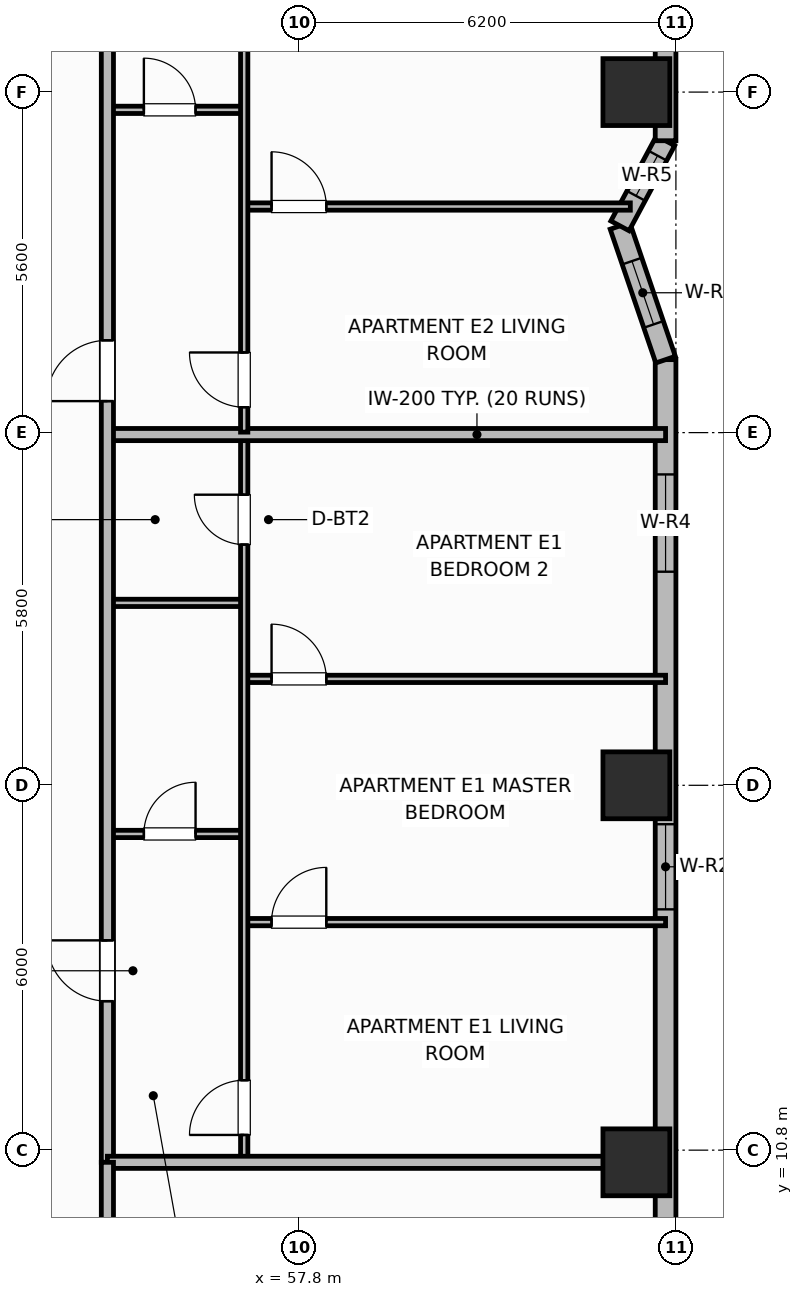
"""IFC4 building model, lengths in metres.
Left out: names, types, materials, properties, quantities, classifications, styles, units other than length and angle.
Written with IfcOpenShell. Run it as: python <this file> out.ifc"""

import sys

from ifc_helpers import new_model, si_unit, direction, frame, frame_2d, origin, origin_2d, place, context, subcontext, project, spatial, rectangle, extrude, element, fill, save


model = new_model("IFC4")
c1 = context("Model", 3, precision=1e-05, world=origin(), true_north=direction((0.0, 1.0)))
c2 = subcontext(c1, "Body", "Model", "MODEL_VIEW")
j1 = project(units=[si_unit("LENGTHUNIT", "METRE"), si_unit("PLANEANGLEUNIT", "RADIAN")], contexts=[c1])
p1 = place(None, origin())
s1 = spatial("IfcSite", under=j1, at=p1, CompositionType="ELEMENT")
p2 = place(p1, origin())
s2 = spatial("IfcBuilding", under=s1, at=p2, CompositionType="ELEMENT")
p3 = place(p2, frame((0.0, 0.0, 121.6)))
s3 = spatial("IfcBuildingStorey", under=s2, at=p3, CompositionType="ELEMENT", Elevation=121.6)
for number, where, z_axis, x_axis in (
    (1, (63.35, 10.6, 0.0), (0.0, 0.0, 1.0), (1.0, 0.0, 0.0)),
    (2, (63.35, 16.8, 0.0), (0.0, 0.0, 1.0), (1.0, 0.0, 0.0)),
    (3, (63.35, 28.2, 0.0), (0.0, 0.0, 1.0), (1.0, 0.0, 0.0)),
):
    element("IfcColumn", number, at=place(p3, frame(where, z_axis=z_axis, x_axis=x_axis)), inside=s3, PredefinedType="COLUMN", context=c2, shape_type="SweptSolid", body=[
        extrude(rectangle(XDim=1.1, YDim=1.1, at=origin_2d()), origin(), (0.0, 0.0, 1.0), 3.7),
    ])
p4 = place(p3, frame((63.83, 9.0, 0.0), z_axis=(0.0, 0.0, 1.0), x_axis=(0.0, 1.0, 0.0)))
e4 = element("IfcWall", 4, at=p4, inside=s3, PredefinedType="SOLIDWALL", context=c2, shape_type="SweptSolid", body=[
    extrude(rectangle(XDim=14.8, YDim=0.34, at=frame_2d((7.4, 0.0))), origin(), (0.0, 0.0, 1.0), 2.7),
])
p5 = place(p4, frame((5.76, 0.0, 0.69)))
e5 = element("IfcOpeningElement", 5, at=p5, cuts=e4, PredefinedType="OPENING", context=c2, shape_type="SweptSolid", body=[
    extrude(rectangle(XDim=1.4, YDim=1.85, at=frame_2d((0.7, 0.925))), frame((0.0, 0.18, 0.0), z_axis=(0.0, -1.0, 0.0), x_axis=(1.0, 0.0, 0.0)), (0.0, 0.0, 1.0), 0.36),
])
p6 = place(p4, frame((11.312, 0.0, 0.68)))
e6 = element("IfcOpeningElement", 6, at=p6, cuts=e4, PredefinedType="OPENING", context=c2, shape_type="SweptSolid", body=[
    extrude(rectangle(XDim=1.6, YDim=1.9, at=frame_2d((0.8, 0.95))), frame((0.0, 0.18, 0.0), z_axis=(0.0, -1.0, 0.0), x_axis=(1.0, 0.0, 0.0)), (0.0, 0.0, 1.0), 0.36),
])
p7 = place(p3, frame((63.83, 23.8, 0.0), z_axis=(0.0, 0.0, 1.0), x_axis=(-0.322680343871, 0.946508000853, 0.0)))
e7 = element("IfcWall", 7, at=p7, inside=s3, PredefinedType="SOLIDWALL", context=c2, shape_type="SweptSolid", body=[
    extrude(rectangle(XDim=2.324, YDim=0.34, at=frame_2d((1.162, 0.0))), origin(), (0.0, 0.0, 1.0), 2.7),
])
p8 = place(p7, frame((0.612, 0.0, 0.89)))
e8 = element("IfcOpeningElement", 8, at=p8, cuts=e7, PredefinedType="OPENING", context=c2, shape_type="SweptSolid", body=[
    extrude(rectangle(XDim=1.1, YDim=1.65, at=frame_2d((0.55, 0.825))), frame((0.0, 0.18, 0.0), z_axis=(0.0, -1.0, 0.0), x_axis=(1.0, 0.0, 0.0)), (0.0, 0.0, 1.0), 0.36),
])
p9 = place(p3, frame((63.08, 26.0, 0.0), z_axis=(0.0, 0.0, 1.0), x_axis=(0.472247007964, 0.881466257703, 0.0)))
e9 = element("IfcWall", 9, at=p9, inside=s3, PredefinedType="SOLIDWALL", context=c2, shape_type="SweptSolid", body=[
    extrude(rectangle(XDim=1.588, YDim=0.34, at=frame_2d((0.794, 0.0))), origin(), (0.0, 0.0, 1.0), 2.7),
])
p10 = place(p9, frame((0.56, 0.0, 0.89)))
e10 = element("IfcOpeningElement", 10, at=p10, cuts=e9, PredefinedType="OPENING", context=c2, shape_type="SweptSolid", body=[
    extrude(rectangle(XDim=0.75, YDim=1.65, at=frame_2d((0.375, 0.825))), frame((0.0, 0.18, 0.0), z_axis=(0.0, -1.0, 0.0), x_axis=(1.0, 0.0, 0.0)), (0.0, 0.0, 1.0), 0.36),
])
p11 = place(p3, frame((63.83, 27.4, 0.0), z_axis=(0.0, 0.0, 1.0), x_axis=(0.0, 1.0, 0.0)))
e11 = element("IfcWall", 11, at=p11, inside=s3, PredefinedType="SOLIDWALL", context=c2, shape_type="SweptSolid", body=[
    extrude(rectangle(XDim=1.6, YDim=0.34, at=frame_2d((0.8, 0.0))), origin(), (0.0, 0.0, 1.0), 2.7),
])
p12 = place(p3, frame((54.65, 16.0, 0.0), z_axis=(0.0, 0.0, 1.0), x_axis=(1.0, 0.0, 0.0)))
e12 = element("IfcWall", 12, at=p12, inside=s3, PredefinedType="PARTITIONING", context=c2, shape_type="SweptSolid", body=[
    extrude(rectangle(XDim=2.25, YDim=0.12, at=frame_2d((1.125, 0.0))), origin(), (0.0, 0.0, 1.0), 2.53),
])
p13 = place(p12, frame((0.6, 0.0, 0.0)))
e13 = element("IfcOpeningElement", 13, at=p13, cuts=e12, PredefinedType="OPENING", context=c2, shape_type="SweptSolid", body=[
    extrude(rectangle(XDim=0.85, YDim=2.1, at=frame_2d((0.425, 1.05))), frame((0.0, 0.07, 0.0), z_axis=(0.0, -1.0, 0.0), x_axis=(1.0, 0.0, 0.0)), (0.0, 0.0, 1.0), 0.14),
])
p14 = place(p3, frame((54.65, 19.8, 0.0), z_axis=(0.0, 0.0, 1.0), x_axis=(1.0, 0.0, 0.0)))
e14 = element("IfcWall", 14, at=p14, inside=s3, PredefinedType="PARTITIONING", context=c2, shape_type="SweptSolid", body=[
    extrude(rectangle(XDim=2.25, YDim=0.12, at=frame_2d((1.125, 0.0))), origin(), (0.0, 0.0, 1.0), 2.53),
])
p15 = place(p3, frame((56.9, 14.55, 0.0), z_axis=(0.0, 0.0, 1.0), x_axis=(1.0, 0.0, 0.0)))
e15 = element("IfcWall", 15, at=p15, inside=s3, PredefinedType="PARTITIONING", context=c2, shape_type="SweptSolid", body=[
    extrude(rectangle(XDim=6.93, YDim=0.12, at=frame_2d((3.465, 0.0))), origin(), (0.0, 0.0, 1.0), 2.53),
])
p16 = place(p15, frame((0.45, 0.0, 0.0)))
e16 = element("IfcOpeningElement", 16, at=p16, cuts=e15, PredefinedType="OPENING", context=c2, shape_type="SweptSolid", body=[
    extrude(rectangle(XDim=0.9, YDim=2.1, at=frame_2d((0.45, 1.05))), frame((0.0, 0.07, 0.0), z_axis=(0.0, -1.0, 0.0), x_axis=(1.0, 0.0, 0.0)), (0.0, 0.0, 1.0), 0.14),
])
p17 = place(p3, frame((56.9, 18.55, 0.0), z_axis=(0.0, 0.0, 1.0), x_axis=(1.0, 0.0, 0.0)))
e17 = element("IfcWall", 17, at=p17, inside=s3, PredefinedType="PARTITIONING", context=c2, shape_type="SweptSolid", body=[
    extrude(rectangle(XDim=6.93, YDim=0.12, at=frame_2d((3.465, 0.0))), origin(), (0.0, 0.0, 1.0), 2.53),
])
p18 = place(p17, frame((0.45, 0.0, 0.0)))
e18 = element("IfcOpeningElement", 18, at=p18, cuts=e17, PredefinedType="OPENING", context=c2, shape_type="SweptSolid", body=[
    extrude(rectangle(XDim=0.9, YDim=2.1, at=frame_2d((0.45, 1.05))), frame((0.0, 0.07, 0.0), z_axis=(0.0, -1.0, 0.0), x_axis=(1.0, 0.0, 0.0)), (0.0, 0.0, 1.0), 0.14),
])
p19 = place(p3, frame((56.9, 10.64, 0.0), z_axis=(0.0, 0.0, 1.0), x_axis=(0.0, 1.0, 0.0)))
e19 = element("IfcWall", 19, at=p19, inside=s3, PredefinedType="PARTITIONING", context=c2, shape_type="SweptSolid", body=[
    extrude(rectangle(XDim=11.888, YDim=0.12, at=frame_2d((5.944, 0.0))), origin(), (0.0, 0.0, 1.0), 2.53),
])
p20 = place(p19, frame((0.41, 0.0, 0.0)))
e20 = element("IfcOpeningElement", 20, at=p20, cuts=e19, PredefinedType="OPENING", context=c2, shape_type="SweptSolid", body=[
    extrude(rectangle(XDim=0.9, YDim=2.1, at=frame_2d((0.45, 1.05))), frame((0.0, 0.07, 0.0), z_axis=(0.0, -1.0, 0.0), x_axis=(1.0, 0.0, 0.0)), (0.0, 0.0, 1.0), 0.14),
])
p21 = place(p19, frame((10.119, 0.0, 0.0)))
e21 = element("IfcOpeningElement", 21, at=p21, cuts=e19, PredefinedType="OPENING", context=c2, shape_type="SweptSolid", body=[
    extrude(rectangle(XDim=0.82, YDim=2.08, at=frame_2d((0.41, 1.04))), frame((0.0, 0.07, 0.0), z_axis=(0.0, -1.0, 0.0), x_axis=(1.0, 0.0, 0.0)), (0.0, 0.0, 1.0), 0.14),
])
p22 = place(p3, frame((54.65, 22.568, 0.0), z_axis=(0.0, 0.0, 1.0), x_axis=(1.0, 0.0, 0.0)))
e22 = element("IfcWall", 22, at=p22, inside=s3, PredefinedType="PARTITIONING", context=c2, shape_type="SweptSolid", body=[
    extrude(rectangle(XDim=9.18, YDim=0.2, at=frame_2d((4.59, 0.0))), origin(), (0.0, 0.0, 1.0), 2.53),
])
p23 = place(p3, frame((54.65, 27.908, 0.0), z_axis=(0.0, 0.0, 1.0), x_axis=(1.0, 0.0, 0.0)))
e23 = element("IfcWall", 23, at=p23, inside=s3, PredefinedType="PARTITIONING", context=c2, shape_type="SweptSolid", body=[
    extrude(rectangle(XDim=2.25, YDim=0.12, at=frame_2d((1.125, 0.0))), origin(), (0.0, 0.0, 1.0), 2.53),
])
p24 = place(p23, frame((0.6, 0.0, 0.0)))
e24 = element("IfcOpeningElement", 24, at=p24, cuts=e23, PredefinedType="OPENING", context=c2, shape_type="SweptSolid", body=[
    extrude(rectangle(XDim=0.85, YDim=2.1, at=frame_2d((0.425, 1.05))), frame((0.0, 0.07, 0.0), z_axis=(0.0, -1.0, 0.0), x_axis=(1.0, 0.0, 0.0)), (0.0, 0.0, 1.0), 0.14),
])
p25 = place(p3, frame((56.9, 26.318, 0.0), z_axis=(0.0, 0.0, 1.0), x_axis=(1.0, 0.0, 0.0)))
e25 = element("IfcWall", 25, at=p25, inside=s3, PredefinedType="PARTITIONING", context=c2, shape_type="SweptSolid", body=[
    extrude(rectangle(XDim=6.351, YDim=0.12, at=frame_2d((3.175, 0.0))), origin(), (0.0, 0.0, 1.0), 2.53),
])
p26 = place(p25, frame((0.45, 0.0, 0.0)))
e26 = element("IfcOpeningElement", 26, at=p26, cuts=e25, PredefinedType="OPENING", context=c2, shape_type="SweptSolid", body=[
    extrude(rectangle(XDim=0.9, YDim=2.1, at=frame_2d((0.45, 1.05))), frame((0.0, 0.07, 0.0), z_axis=(0.0, -1.0, 0.0), x_axis=(1.0, 0.0, 0.0)), (0.0, 0.0, 1.0), 0.14),
])
p27 = place(p3, frame((56.9, 22.608, 0.0), z_axis=(0.0, 0.0, 1.0), x_axis=(0.0, 1.0, 0.0)))
e27 = element("IfcWall", 27, at=p27, inside=s3, PredefinedType="PARTITIONING", context=c2, shape_type="SweptSolid", body=[
    extrude(rectangle(XDim=11.052, YDim=0.12, at=frame_2d((5.526, 0.0))), origin(), (0.0, 0.0, 1.0), 2.53),
])
p28 = place(p27, frame((0.41, 0.0, 0.0)))
e28 = element("IfcOpeningElement", 28, at=p28, cuts=e27, PredefinedType="OPENING", context=c2, shape_type="SweptSolid", body=[
    extrude(rectangle(XDim=0.9, YDim=2.1, at=frame_2d((0.45, 1.05))), frame((0.0, 0.07, 0.0), z_axis=(0.0, -1.0, 0.0), x_axis=(1.0, 0.0, 0.0)), (0.0, 0.0, 1.0), 0.14),
])
p29 = place(p3, frame((54.65, 10.6, 0.0), z_axis=(0.0, 0.0, 1.0), x_axis=(0.0, 1.0, 0.0)))
e29 = element("IfcWall", 29, at=p29, inside=s3, PredefinedType="PARTITIONING", context=c2, shape_type="SweptSolid", body=[
    extrude(rectangle(XDim=35.2, YDim=0.2, at=frame_2d((17.6, 0.0))), origin(), (0.0, 0.0, 1.0), 2.53),
])
p30 = place(p29, frame((2.65, 0.0, 0.0)))
e30 = element("IfcOpeningElement", 30, at=p30, cuts=e29, PredefinedType="OPENING", context=c2, shape_type="SweptSolid", body=[
    extrude(rectangle(XDim=1.0, YDim=2.15, at=frame_2d((0.5, 1.075))), frame((0.0, 0.11, 0.0), z_axis=(0.0, -1.0, 0.0), x_axis=(1.0, 0.0, 0.0)), (0.0, 0.0, 1.0), 0.22),
])
p31 = place(p29, frame((12.518, 0.0, 0.0)))
e31 = element("IfcOpeningElement", 31, at=p31, cuts=e29, PredefinedType="OPENING", context=c2, shape_type="SweptSolid", body=[
    extrude(rectangle(XDim=1.0, YDim=2.15, at=frame_2d((0.5, 1.075))), frame((0.0, 0.11, 0.0), z_axis=(0.0, -1.0, 0.0), x_axis=(1.0, 0.0, 0.0)), (0.0, 0.0, 1.0), 0.22),
])
p32 = place(p29, frame((23.65, 0.0, 0.0)))
e32 = element("IfcOpeningElement", 32, at=p32, cuts=e29, PredefinedType="OPENING", context=c2, shape_type="SweptSolid", body=[
    extrude(rectangle(XDim=1.0, YDim=2.15, at=frame_2d((0.5, 1.075))), frame((0.0, 0.11, 0.0), z_axis=(0.0, -1.0, 0.0), x_axis=(1.0, 0.0, 0.0)), (0.0, 0.0, 1.0), 0.22),
])
p33 = place(p3, frame((54.65, 10.6, 0.0), z_axis=(0.0, 0.0, 1.0), x_axis=(1.0, 0.0, 0.0)))
e33 = element("IfcWall", 33, at=p33, inside=s3, PredefinedType="PARTITIONING", context=c2, shape_type="SweptSolid", body=[
    extrude(rectangle(XDim=8.76, YDim=0.2, at=frame_2d((4.38, 0.0))), origin(), (0.0, 0.0, 1.0), 2.53),
])
p34 = place(p3, frame((54.65, 4.97, 0.0), z_axis=(0.0, 0.0, 1.0), x_axis=(0.0, 1.0, 0.0)))
e34 = element("IfcWall", 34, at=p34, inside=s3, PredefinedType="PARTITIONING", context=c2, shape_type="SweptSolid", body=[
    extrude(rectangle(XDim=5.63, YDim=0.2, at=frame_2d((2.815, 0.0))), origin(), (0.0, 0.0, 1.0), 2.53),
])
p35 = place(p5, origin())
e35 = element("IfcWindow", 35, at=p35, inside=s3, PartitioningType="SINGLE_PANEL", PredefinedType="WINDOW", context=c2, shape_type="SweptSolid", body=[
    extrude(rectangle(XDim=1.4, YDim=1.85, at=frame_2d((0.7, 0.925))), frame((0.0, 0.03, 0.0), z_axis=(0.0, -1.0, 0.0), x_axis=(1.0, 0.0, 0.0)), (0.0, 0.0, 1.0), 0.06),
])
fill(e5, e35)
p36 = place(p6, origin())
e36 = element("IfcWindow", 36, at=p36, inside=s3, PartitioningType="SINGLE_PANEL", PredefinedType="WINDOW", context=c2, shape_type="SweptSolid", body=[
    extrude(rectangle(XDim=1.6, YDim=1.9, at=frame_2d((0.8, 0.95))), frame((0.0, 0.03, 0.0), z_axis=(0.0, -1.0, 0.0), x_axis=(1.0, 0.0, 0.0)), (0.0, 0.0, 1.0), 0.06),
])
fill(e6, e36)
p37 = place(p8, origin())
e37 = element("IfcWindow", 37, at=p37, inside=s3, PartitioningType="SINGLE_PANEL", PredefinedType="WINDOW", context=c2, shape_type="SweptSolid", body=[
    extrude(rectangle(XDim=1.1, YDim=1.65, at=frame_2d((0.55, 0.825))), frame((0.0, 0.03, 0.0), z_axis=(0.0, -1.0, 0.0), x_axis=(1.0, 0.0, 0.0)), (0.0, 0.0, 1.0), 0.06),
])
fill(e8, e37)
p38 = place(p10, origin())
e38 = element("IfcWindow", 38, at=p38, inside=s3, PartitioningType="SINGLE_PANEL", PredefinedType="WINDOW", context=c2, shape_type="SweptSolid", body=[
    extrude(rectangle(XDim=0.75, YDim=1.65, at=frame_2d((0.375, 0.825))), frame((0.0, 0.03, 0.0), z_axis=(0.0, -1.0, 0.0), x_axis=(1.0, 0.0, 0.0)), (0.0, 0.0, 1.0), 0.06),
])
fill(e10, e38)
p39 = place(p13, origin())
e39 = element("IfcDoor", 39, at=p39, inside=s3, OperationType="SINGLE_SWING_RIGHT", PredefinedType="DOOR", context=c2, shape_type="SweptSolid", body=[
    extrude(rectangle(XDim=0.85, YDim=2.1, at=frame_2d((0.425, 1.05))), frame((0.0, 0.025, 0.0), z_axis=(0.0, -1.0, 0.0), x_axis=(1.0, 0.0, 0.0)), (0.0, 0.0, 1.0), 0.05),
])
fill(e13, e39)
p40 = place(p16, origin())
e40 = element("IfcDoor", 40, at=p40, inside=s3, OperationType="SINGLE_SWING_RIGHT", PredefinedType="DOOR", context=c2, shape_type="SweptSolid", body=[
    extrude(rectangle(XDim=0.9, YDim=2.1, at=frame_2d((0.45, 1.05))), frame((0.0, 0.025, 0.0), z_axis=(0.0, -1.0, 0.0), x_axis=(1.0, 0.0, 0.0)), (0.0, 0.0, 1.0), 0.05),
])
fill(e16, e40)
p41 = place(p18, origin())
e41 = element("IfcDoor", 41, at=p41, inside=s3, OperationType="SINGLE_SWING_LEFT", PredefinedType="DOOR", context=c2, shape_type="SweptSolid", body=[
    extrude(rectangle(XDim=0.9, YDim=2.1, at=frame_2d((0.45, 1.05))), frame((0.0, 0.025, 0.0), z_axis=(0.0, -1.0, 0.0), x_axis=(1.0, 0.0, 0.0)), (0.0, 0.0, 1.0), 0.05),
])
fill(e18, e41)
p42 = place(p20, origin())
e42 = element("IfcDoor", 42, at=p42, inside=s3, OperationType="SINGLE_SWING_LEFT", PredefinedType="DOOR", context=c2, shape_type="SweptSolid", body=[
    extrude(rectangle(XDim=0.9, YDim=2.1, at=frame_2d((0.45, 1.05))), frame((0.0, 0.025, 0.0), z_axis=(0.0, -1.0, 0.0), x_axis=(1.0, 0.0, 0.0)), (0.0, 0.0, 1.0), 0.05),
])
fill(e20, e42)
p43 = place(p21, origin())
e43 = element("IfcDoor", 43, at=p43, inside=s3, OperationType="SINGLE_SWING_RIGHT", PredefinedType="DOOR", context=c2, shape_type="SweptSolid", body=[
    extrude(rectangle(XDim=0.82, YDim=2.08, at=frame_2d((0.41, 1.04))), frame((0.0, 0.025, 0.0), z_axis=(0.0, -1.0, 0.0), x_axis=(1.0, 0.0, 0.0)), (0.0, 0.0, 1.0), 0.05),
])
fill(e21, e43)
p44 = place(p24, origin())
e44 = element("IfcDoor", 44, at=p44, inside=s3, OperationType="SINGLE_SWING_LEFT", PredefinedType="DOOR", context=c2, shape_type="SweptSolid", body=[
    extrude(rectangle(XDim=0.85, YDim=2.1, at=frame_2d((0.425, 1.05))), frame((0.0, 0.025, 0.0), z_axis=(0.0, -1.0, 0.0), x_axis=(1.0, 0.0, 0.0)), (0.0, 0.0, 1.0), 0.05),
])
fill(e24, e44)
p45 = place(p26, origin())
e45 = element("IfcDoor", 45, at=p45, inside=s3, OperationType="SINGLE_SWING_LEFT", PredefinedType="DOOR", context=c2, shape_type="SweptSolid", body=[
    extrude(rectangle(XDim=0.9, YDim=2.1, at=frame_2d((0.45, 1.05))), frame((0.0, 0.025, 0.0), z_axis=(0.0, -1.0, 0.0), x_axis=(1.0, 0.0, 0.0)), (0.0, 0.0, 1.0), 0.05),
])
fill(e26, e45)
p46 = place(p28, origin())
e46 = element("IfcDoor", 46, at=p46, inside=s3, OperationType="SINGLE_SWING_RIGHT", PredefinedType="DOOR", context=c2, shape_type="SweptSolid", body=[
    extrude(rectangle(XDim=0.9, YDim=2.1, at=frame_2d((0.45, 1.05))), frame((0.0, 0.025, 0.0), z_axis=(0.0, -1.0, 0.0), x_axis=(1.0, 0.0, 0.0)), (0.0, 0.0, 1.0), 0.05),
])
fill(e28, e46)
p47 = place(p30, origin())
e47 = element("IfcDoor", 47, at=p47, inside=s3, OperationType="SINGLE_SWING_RIGHT", PredefinedType="DOOR", context=c2, shape_type="SweptSolid", body=[
    extrude(rectangle(XDim=1.0, YDim=2.15, at=frame_2d((0.5, 1.075))), frame((0.0, 0.025, 0.0), z_axis=(0.0, -1.0, 0.0), x_axis=(1.0, 0.0, 0.0)), (0.0, 0.0, 1.0), 0.05),
])
fill(e30, e47)
p48 = place(p31, origin())
e48 = element("IfcDoor", 48, at=p48, inside=s3, OperationType="SINGLE_SWING_LEFT", PredefinedType="DOOR", context=c2, shape_type="SweptSolid", body=[
    extrude(rectangle(XDim=1.0, YDim=2.15, at=frame_2d((0.5, 1.075))), frame((0.0, 0.025, 0.0), z_axis=(0.0, -1.0, 0.0), x_axis=(1.0, 0.0, 0.0)), (0.0, 0.0, 1.0), 0.05),
])
fill(e31, e48)
save(model, sys.argv[1])
